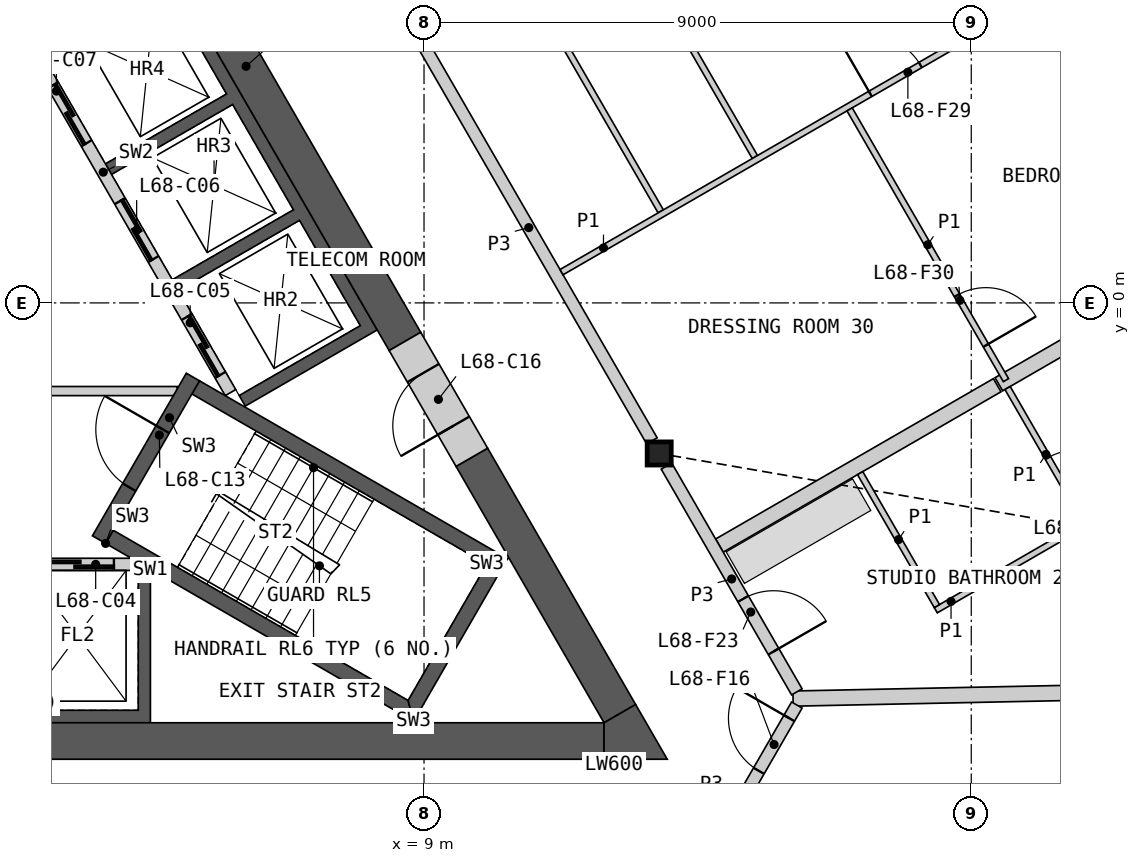
"""IFC4 building model, lengths in metres.
Left out: names, types, materials, properties, quantities, classifications, styles, units other than length and angle.
Written with IfcOpenShell. Run it as: python <this file> out.ifc"""

import sys

from ifc_helpers import new_model, si_unit, direction, frame, frame_2d, origin, origin_2d, place, context, subcontext, project, spatial, polyline, rectangle, i_section, outline, extrude, element, fill, save


model = new_model("IFC4")
c1 = context("Model", 3, precision=1e-05, world=origin(), true_north=direction((0.0, 1.0)))
c2 = subcontext(c1, "Body", "Model", "MODEL_VIEW")
j1 = project(units=[si_unit("LENGTHUNIT", "METRE"), si_unit("PLANEANGLEUNIT", "RADIAN")], contexts=[c1])
p1 = place(None, origin())
s1 = spatial("IfcSite", under=j1, at=p1, CompositionType="ELEMENT")
p2 = place(p1, origin())
s2 = spatial("IfcBuilding", under=s1, at=p2, CompositionType="ELEMENT")
p3 = place(p2, frame((0.0, 0.0, 312.0)))
s3 = spatial("IfcBuildingStorey", under=s2, at=p3, CompositionType="ELEMENT", Elevation=312.0)
p4 = place(p3, frame((12.868, -2.476, 0.0), z_axis=(0.0, 0.0, 1.0), x_axis=(1.0, 0.0, 0.0)))
e1 = element("IfcColumn", 1, at=p4, inside=s3, PredefinedType="COLUMN", context=c2, shape_type="SweptSolid", body=[
    extrude(i_section(OverallWidth=0.396, OverallDepth=0.381, WebThickness=0.019, FlangeThickness=0.03, at=origin_2d()), origin(), (0.0, 0.0, 1.0), 3.4),
])
p5 = place(p3, frame((25.155, 2.826, 0.0), z_axis=(0.0, 0.0, 1.0), x_axis=(-0.951053709789, 0.309025631781, 0.0)))
e2 = element("IfcWall", 2, at=p5, inside=s3, PredefinedType="SOLIDWALL", context=c2, shape_type="SweptSolid", body=[
    extrude(rectangle(XDim=6.12, YDim=0.2, at=frame_2d((3.06, 0.0))), origin(), (0.0, 0.0, 1.0), 2.488),
])
p6 = place(p5, frame((2.26, 0.0, 0.0)))
e3 = element("IfcOpeningElement", 3, at=p6, cuts=e2, PredefinedType="OPENING", context=c2, shape_type="SweptSolid", body=[
    extrude(rectangle(XDim=1.6, YDim=2.25, at=frame_2d((0.8, 1.125))), frame((0.0, 0.11, 0.0), z_axis=(0.0, -1.0, 0.0), x_axis=(1.0, 0.0, 0.0)), (0.0, 0.0, 1.0), 0.22),
])
p7 = place(p3, origin())
e4 = element("IfcWall", 4, at=p7, inside=s3, PredefinedType="SHEAR", context=c2, shape_type="SweptSolid", body=[
    extrude(outline(polyline([(4.5, -4.4), (4.5, -6.906), (-4.5, -6.906), (-4.5, -4.4), (-4.3, -4.4), (-4.3, -6.7), (-2.3, -6.7), (-2.3, -4.4), (-2.1, -4.4), (-2.1, -6.7), (-0.1, -6.7), (-0.1, -4.4), (0.1, -4.4), (0.1, -6.7), (2.1, -6.7), (2.1, -4.4), (2.3, -4.4), (2.3, -6.7), (4.3, -6.7), (4.3, -4.4), (4.5, -4.4)])), origin(), (0.0, 0.0, 1.0), 3.1),
])
p8 = place(p3, frame((-4.187, -4.3, 0.0), z_axis=(0.0, 0.0, 1.0), x_axis=(1.0, 0.0, 0.0)))
e5 = element("IfcWall", 5, at=p8, inside=s3, PredefinedType="SOLIDWALL", context=c2, shape_type="SweptSolid", body=[
    extrude(rectangle(XDim=8.373, YDim=0.2, at=frame_2d((4.187, 0.0))), origin(), (0.0, 0.0, 1.0), 3.1),
])
p9 = place(p8, frame((0.287, 0.0, 0.0)))
e6 = element("IfcOpeningElement", 6, at=p9, cuts=e5, PredefinedType="OPENING", context=c2, shape_type="SweptSolid", body=[
    extrude(rectangle(XDim=1.2, YDim=2.1, at=frame_2d((0.6, 1.05))), frame((0.0, 0.11, 0.0), z_axis=(0.0, -1.0, 0.0), x_axis=(1.0, 0.0, 0.0)), (0.0, 0.0, 1.0), 0.22),
])
p10 = place(p8, frame((2.387, 0.0, 0.0)))
e7 = element("IfcOpeningElement", 7, at=p10, cuts=e5, PredefinedType="OPENING", context=c2, shape_type="SweptSolid", body=[
    extrude(rectangle(XDim=1.4, YDim=2.1, at=frame_2d((0.7, 1.05))), frame((0.0, 0.11, 0.0), z_axis=(0.0, -1.0, 0.0), x_axis=(1.0, 0.0, 0.0)), (0.0, 0.0, 1.0), 0.22),
])
p11 = place(p8, frame((4.737, 0.0, 0.0)))
e8 = element("IfcOpeningElement", 8, at=p11, cuts=e5, PredefinedType="OPENING", context=c2, shape_type="SweptSolid", body=[
    extrude(rectangle(XDim=1.1, YDim=2.1, at=frame_2d((0.55, 1.05))), frame((0.0, 0.11, 0.0), z_axis=(0.0, -1.0, 0.0), x_axis=(1.0, 0.0, 0.0)), (0.0, 0.0, 1.0), 0.22),
])
p12 = place(p8, frame((6.887, 0.0, 0.0)))
e9 = element("IfcOpeningElement", 9, at=p12, cuts=e5, PredefinedType="OPENING", context=c2, shape_type="SweptSolid", body=[
    extrude(rectangle(XDim=1.2, YDim=2.1, at=frame_2d((0.6, 1.05))), frame((0.0, 0.11, 0.0), z_axis=(0.0, -1.0, 0.0), x_axis=(1.0, 0.0, 0.0)), (0.0, 0.0, 1.0), 0.22),
])
p13 = place(p3, origin())
e10 = element("IfcWall", 10, at=p13, inside=s3, PredefinedType="SHEAR", context=c2, shape_type="SweptSolid", body=[
    extrude(outline(polyline([(1.561, 6.097), (3.731, 7.35), (8.231, -0.444), (6.061, -1.697), (5.96, -1.524), (7.952, -0.374), (6.952, 1.358), (4.96, 0.208), (4.861, 0.381), (6.852, 1.531), (5.852, 3.263), (3.861, 2.113), (3.76, 2.287), (5.752, 3.437), (4.752, 5.169), (2.76, 4.019), (2.66, 4.192), (4.652, 5.342), (3.652, 7.074), (1.66, 5.924), (1.561, 6.097)])), origin(), (0.0, 0.0, 1.0), 3.1),
])
p14 = place(p3, frame((5.817, -1.476, 0.0), z_axis=(0.0, 0.0, 1.0), x_axis=(-0.500002616675, 0.866023893041, 0.0)))
e11 = element("IfcWall", 11, at=p14, inside=s3, PredefinedType="SOLIDWALL", context=c2, shape_type="SweptSolid", body=[
    extrude(rectangle(XDim=8.373, YDim=0.2, at=frame_2d((4.187, 0.0))), origin(), (0.0, 0.0, 1.0), 3.1),
])
p15 = place(p14, frame((0.337, 0.0, 0.0)))
e12 = element("IfcOpeningElement", 12, at=p15, cuts=e11, PredefinedType="OPENING", context=c2, shape_type="SweptSolid", body=[
    extrude(rectangle(XDim=1.1, YDim=2.1, at=frame_2d((0.55, 1.05))), frame((0.0, 0.11, 0.0), z_axis=(0.0, -1.0, 0.0), x_axis=(1.0, 0.0, 0.0)), (0.0, 0.0, 1.0), 0.22),
])
p16 = place(p14, frame((2.537, 0.0, 0.0)))
e13 = element("IfcOpeningElement", 13, at=p16, cuts=e11, PredefinedType="OPENING", context=c2, shape_type="SweptSolid", body=[
    extrude(rectangle(XDim=1.1, YDim=2.1, at=frame_2d((0.55, 1.05))), frame((0.0, 0.11, 0.0), z_axis=(0.0, -1.0, 0.0), x_axis=(1.0, 0.0, 0.0)), (0.0, 0.0, 1.0), 0.22),
])
p17 = place(p14, frame((4.737, 0.0, 0.0)))
e14 = element("IfcOpeningElement", 14, at=p17, cuts=e11, PredefinedType="OPENING", context=c2, shape_type="SweptSolid", body=[
    extrude(rectangle(XDim=1.1, YDim=2.1, at=frame_2d((0.55, 1.05))), frame((0.0, 0.11, 0.0), z_axis=(0.0, -1.0, 0.0), x_axis=(1.0, 0.0, 0.0)), (0.0, 0.0, 1.0), 0.22),
])
p18 = place(p14, frame((7.037, 0.0, 0.0)))
e15 = element("IfcOpeningElement", 15, at=p18, cuts=e11, PredefinedType="OPENING", context=c2, shape_type="SweptSolid", body=[
    extrude(rectangle(XDim=0.9, YDim=2.1, at=frame_2d((0.45, 1.05))), frame((0.0, 0.11, 0.0), z_axis=(0.0, -1.0, 0.0), x_axis=(1.0, 0.0, 0.0)), (0.0, 0.0, 1.0), 0.22),
])
p19 = place(p3, frame((-4.941, -1.45, 0.0), z_axis=(0.0, 0.0, 1.0), x_axis=(1.0, 0.0, 0.0)))
e16 = element("IfcWall", 16, at=p19, inside=s3, PredefinedType="PARTITIONING", context=c2, shape_type="SweptSolid", body=[
    extrude(rectangle(XDim=9.882, YDim=0.15, at=frame_2d((4.941, 0.0))), origin(), (0.0, 0.0, 1.0), 3.1),
])
p20 = place(p19, frame((4.391, 0.0, 0.0)))
e17 = element("IfcOpeningElement", 17, at=p20, cuts=e16, PredefinedType="OPENING", context=c2, shape_type="SweptSolid", body=[
    extrude(rectangle(XDim=1.1, YDim=2.1, at=frame_2d((0.55, 1.05))), frame((0.0, 0.085, 0.0), z_axis=(0.0, -1.0, 0.0), x_axis=(1.0, 0.0, 0.0)), (0.0, 0.0, 1.0), 0.17),
])
p21 = place(p3, origin())
e18 = element("IfcWall", 18, at=p21, inside=s3, PredefinedType="SHEAR", context=c2, shape_type="SweptSolid", body=[
    extrude(outline(polyline([(3.763, -3.956), (8.83, -6.881), (8.738, -6.539), (3.888, -3.739), (3.763, -3.956)])), origin(), (0.0, 0.0, 1.0), 3.1),
])
p22 = place(p3, origin())
e19 = element("IfcWall", 19, at=p22, inside=s3, PredefinedType="SHEAR", context=c2, shape_type="SweptSolid", body=[
    extrude(outline(polyline([(8.83, -6.881), (10.374, -4.206), (10.032, -4.298), (8.738, -6.539), (8.83, -6.881)])), origin(), (0.0, 0.0, 1.0), 3.1),
])
p23 = place(p3, origin())
e20 = element("IfcWall", 20, at=p23, inside=s3, PredefinedType="SHEAR", context=c2, shape_type="SweptSolid", body=[
    extrude(outline(polyline([(10.032, -4.298), (10.374, -4.206), (5.307, -1.281), (5.182, -1.498), (10.032, -4.298)])), origin(), (0.0, 0.0, 1.0), 3.1),
])
p24 = place(p3, frame((3.655, -3.893, 0.0), z_axis=(0.0, 0.0, 1.0), x_axis=(0.499982516597, 0.866035497597, 0.0)))
e21 = element("IfcWall", 21, at=p24, inside=s3, PredefinedType="SHEAR", context=c2, shape_type="SweptSolid", body=[
    extrude(rectangle(XDim=3.088, YDim=0.25, at=frame_2d((1.544, 0.0))), origin(), (0.0, 0.0, 1.0), 3.1),
])
p25 = place(p24, frame((0.994, 0.0, 0.0)))
e22 = element("IfcOpeningElement", 22, at=p25, cuts=e21, PredefinedType="OPENING", context=c2, shape_type="SweptSolid", body=[
    extrude(rectangle(XDim=1.1, YDim=2.1, at=frame_2d((0.55, 1.05))), frame((0.0, 0.135, 0.0), z_axis=(0.0, -1.0, 0.0), x_axis=(1.0, 0.0, 0.0)), (0.0, 0.0, 1.0), 0.27),
])
p26 = place(p3, frame((-11.961, -7.206, 0.0), z_axis=(0.0, 0.0, 1.0), x_axis=(1.0, 0.0, 0.0)))
e23 = element("IfcWall", 23, at=p26, inside=s3, PredefinedType="SHEAR", context=c2, shape_type="SweptSolid", body=[
    extrude(rectangle(XDim=23.921, YDim=0.6, at=frame_2d((11.961, 0.0))), origin(), (0.0, 0.0, 1.0), 3.1),
])
p27 = place(p3, frame((8.686, -0.634, 0.0), z_axis=(0.0, 0.0, 1.0), x_axis=(-0.50001836461, 0.866014800712, 0.0)))
e24 = element("IfcWall", 24, at=p27, inside=s3, PredefinedType="SHEAR", context=c2, shape_type="SweptSolid", body=[
    extrude(rectangle(XDim=10.451, YDim=0.6, at=frame_2d((5.225, 0.0))), origin(), (0.0, 0.0, 1.0), 3.1),
])
p28 = place(p3, frame((12.221, -6.756, 0.0), z_axis=(0.0, 0.0, 1.0), x_axis=(-0.50000604952, 0.866021911064, 0.0)))
e25 = element("IfcWall", 25, at=p28, inside=s3, PredefinedType="SHEAR", context=c2, shape_type="SweptSolid", body=[
    extrude(rectangle(XDim=4.869, YDim=0.6, at=frame_2d((2.434, 0.0))), origin(), (0.0, 0.0, 1.0), 3.1),
])
p29 = place(p3, origin())
e26 = element("IfcWall", 26, at=p29, inside=s3, PredefinedType="SHEAR", context=c2, shape_type="SweptSolid", body=[
    extrude(outline(polyline([(11.961, -7.506), (11.961, -6.906), (12.48, -6.606), (13.0, -7.506), (11.961, -7.506)])), origin(), (0.0, 0.0, 1.0), 3.1),
])
p30 = place(p3, frame((9.786, -2.539, 0.0), z_axis=(0.0, 0.0, 1.0), x_axis=(-0.499981787252, 0.866035918664, 0.0)))
e27 = element("IfcWall", 27, at=p30, inside=s3, PredefinedType="SHEAR", context=c2, shape_type="SweptSolid", body=[
    extrude(rectangle(XDim=2.2, YDim=0.6, at=frame_2d((1.1, 0.0))), origin(), (0.0, 0.0, 1.0), 3.1),
])
p31 = place(p30, frame((0.6, 0.0, 0.0)))
e28 = element("IfcOpeningElement", 28, at=p31, cuts=e27, PredefinedType="OPENING", context=c2, shape_type="SweptSolid", body=[
    extrude(rectangle(XDim=1.0, YDim=2.1, at=frame_2d((0.5, 1.05))), frame((0.0, 0.31, 0.0), z_axis=(0.0, -1.0, 0.0), x_axis=(1.0, 0.0, 0.0)), (0.0, 0.0, 1.0), 0.62),
])
p32 = place(p3, frame((15.069, -6.508, 0.0), z_axis=(0.0, 0.0, 1.0), x_axis=(0.999786619639, 0.02065708573, 0.0)))
e29 = element("IfcWall", 29, at=p32, inside=s3, PredefinedType="PARTITIONING", context=c2, shape_type="SweptSolid", body=[
    extrude(rectangle(XDim=14.951, YDim=0.25, at=frame_2d((7.475, 0.0))), origin(), (0.0, 0.0, 1.0), 2.33),
])
p33 = place(p3, frame((8.698, 4.745, 0.0), z_axis=(0.0, 0.0, 1.0), x_axis=(0.499984266882, -0.866034487114, 0.0)))
e30 = element("IfcWall", 30, at=p33, inside=s3, PredefinedType="PARTITIONING", context=c2, shape_type="SweptSolid", body=[
    extrude(rectangle(XDim=8.099, YDim=0.2, at=frame_2d((4.049, 0.0))), origin(), (0.0, 0.0, 1.0), 3.1),
])
p34 = place(p3, frame((18.454, -1.338, 0.0), z_axis=(0.0, 0.0, 1.0), x_axis=(0.866023407002, 0.500003458512, 0.0)))
e31 = element("IfcWall", 31, at=p34, inside=s3, PredefinedType="PARTITIONING", context=c2, shape_type="SweptSolid", body=[
    extrude(rectangle(XDim=7.345, YDim=0.25, at=frame_2d((3.673, 0.0))), origin(), (0.0, 0.0, 1.0), 2.33),
])
p35 = place(p3, frame((13.858, -3.991, 0.0), z_axis=(0.0, 0.0, 1.0), x_axis=(0.866032983855, 0.499986870703, 0.0)))
e32 = element("IfcWall", 32, at=p35, inside=s3, PredefinedType="PARTITIONING", context=c2, shape_type="SweptSolid", body=[
    extrude(rectangle(XDim=5.275, YDim=0.25, at=frame_2d((2.638, 0.0))), origin(), (0.0, 0.0, 1.0), 2.33),
])
p36 = place(p3, frame((12.988, -2.684, 0.0), z_axis=(0.0, 0.0, 1.0), x_axis=(0.500003406062, -0.866023437285, 0.0)))
e33 = element("IfcWall", 33, at=p36, inside=s3, PredefinedType="PARTITIONING", context=c2, shape_type="SweptSolid", body=[
    extrude(rectangle(XDim=4.288, YDim=0.2, at=frame_2d((2.144, 0.0))), origin(), (0.0, 0.0, 1.0), 3.1),
])
p37 = place(p36, frame((2.521, 0.0, 0.0)))
e34 = element("IfcOpeningElement", 34, at=p37, cuts=e33, PredefinedType="OPENING", context=c2, shape_type="SweptSolid", body=[
    extrude(rectangle(XDim=1.0, YDim=2.1, at=frame_2d((0.5, 1.05))), frame((0.0, 0.11, 0.0), z_axis=(0.0, -1.0, 0.0), x_axis=(1.0, 0.0, 0.0)), (0.0, 0.0, 1.0), 0.22),
])
p38 = place(p3, frame((13.293, -9.797, 0.0), z_axis=(0.0, 0.0, 1.0), x_axis=(0.499967746641, 0.866044024469, 0.0)))
e35 = element("IfcWall", 35, at=p38, inside=s3, PredefinedType="PARTITIONING", context=c2, shape_type="SweptSolid", body=[
    extrude(rectangle(XDim=3.676, YDim=0.2, at=frame_2d((1.838, 0.0))), origin(), (0.0, 0.0, 1.0), 3.1),
])
p39 = place(p38, frame((2.426, 0.0, 0.0)))
e36 = element("IfcOpeningElement", 36, at=p39, cuts=e35, PredefinedType="OPENING", context=c2, shape_type="SweptSolid", body=[
    extrude(rectangle(XDim=1.0, YDim=2.1, at=frame_2d((0.5, 1.05))), frame((0.0, 0.11, 0.0), z_axis=(0.0, -1.0, 0.0), x_axis=(1.0, 0.0, 0.0)), (0.0, 0.0, 1.0), 0.22),
])
p40 = place(p3, frame((6.74, 15.739, 0.0), z_axis=(0.0, 0.0, 1.0), x_axis=(0.499995022685, -0.86602827742, 0.0)))
e37 = element("IfcWall", 37, at=p40, inside=s3, PredefinedType="PARTITIONING", context=c2, shape_type="SweptSolid", body=[
    extrude(rectangle(XDim=15.404, YDim=0.1, at=frame_2d((7.702, 0.0))), origin(), (0.0, 0.0, 1.0), 2.33),
])
p41 = place(p40, frame((8.582, 0.0, 0.0)))
e38 = element("IfcOpeningElement", 38, at=p41, cuts=e37, PredefinedType="OPENING", context=c2, shape_type="SweptSolid", body=[
    extrude(rectangle(XDim=0.95, YDim=2.1, at=frame_2d((0.475, 1.05))), frame((0.0, 0.06, 0.0), z_axis=(0.0, -1.0, 0.0), x_axis=(1.0, 0.0, 0.0)), (0.0, 0.0, 1.0), 0.12),
])
p42 = place(p3, frame((6.504, 12.572, 0.0), z_axis=(0.0, 0.0, 1.0), x_axis=(0.499998094172, -0.866026504112, 0.0)))
e39 = element("IfcWall", 39, at=p42, inside=s3, PredefinedType="PARTITIONING", context=c2, shape_type="SweptSolid", body=[
    extrude(rectangle(XDim=12.778, YDim=0.1, at=frame_2d((6.389, 0.0))), origin(), (0.0, 0.0, 1.0), 2.33),
])
p43 = place(p42, frame((3.759, 0.0, 0.0)))
e40 = element("IfcOpeningElement", 40, at=p43, cuts=e39, PredefinedType="OPENING", context=c2, shape_type="SweptSolid", body=[
    extrude(rectangle(XDim=0.95, YDim=2.1, at=frame_2d((0.475, 1.05))), frame((0.0, 0.06, 0.0), z_axis=(0.0, -1.0, 0.0), x_axis=(1.0, 0.0, 0.0)), (0.0, 0.0, 1.0), 0.12),
])
p44 = place(p3, frame((11.261, 0.506, 0.0), z_axis=(0.0, 0.0, 1.0), x_axis=(0.866024323732, 0.500001870701, 0.0)))
e41 = element("IfcWall", 41, at=p44, inside=s3, PredefinedType="PARTITIONING", context=c2, shape_type="SweptSolid", body=[
    extrude(rectangle(XDim=7.967, YDim=0.1, at=frame_2d((3.983, 0.0))), origin(), (0.0, 0.0, 1.0), 2.33),
])
p45 = place(p44, frame((5.865, 0.0, 0.0)))
e42 = element("IfcOpeningElement", 42, at=p45, cuts=e41, PredefinedType="OPENING", context=c2, shape_type="SweptSolid", body=[
    extrude(rectangle(XDim=0.95, YDim=2.1, at=frame_2d((0.475, 1.05))), frame((0.0, 0.06, 0.0), z_axis=(0.0, -1.0, 0.0), x_axis=(1.0, 0.0, 0.0)), (0.0, 0.0, 1.0), 0.12),
])
p46 = place(p3, frame((15.999, 3.183, 0.0), z_axis=(0.0, 0.0, 1.0), x_axis=(0.500014207086, -0.866017201164, 0.0)))
e43 = element("IfcWall", 43, at=p46, inside=s3, PredefinedType="PARTITIONING", context=c2, shape_type="SweptSolid", body=[
    extrude(rectangle(XDim=5.143, YDim=0.1, at=frame_2d((2.571, 0.0))), origin(), (0.0, 0.0, 1.0), 2.33),
])
p47 = place(p46, frame((3.532, 0.0, 0.0)))
e44 = element("IfcOpeningElement", 44, at=p47, cuts=e43, PredefinedType="OPENING", context=c2, shape_type="SweptSolid", body=[
    extrude(rectangle(XDim=0.95, YDim=2.1, at=frame_2d((0.475, 1.05))), frame((0.0, 0.06, 0.0), z_axis=(0.0, -1.0, 0.0), x_axis=(1.0, 0.0, 0.0)), (0.0, 0.0, 1.0), 0.12),
])
p48 = place(p3, frame((17.416, -5.055, 0.0), z_axis=(0.0, 0.0, 1.0), x_axis=(0.866032775405, 0.499987231761, 0.0)))
e45 = element("IfcWall", 45, at=p48, inside=s3, PredefinedType="PARTITIONING", context=c2, shape_type="SweptSolid", body=[
    extrude(rectangle(XDim=2.9, YDim=0.1, at=frame_2d((1.45, 0.0))), origin(), (0.0, 0.0, 1.0), 2.33),
])
p49 = place(p3, frame((16.172, -2.8, 0.0), z_axis=(0.0, 0.0, 1.0), x_axis=(0.50001820224, -0.866014894461, 0.0)))
e46 = element("IfcWall", 46, at=p49, inside=s3, PredefinedType="PARTITIONING", context=c2, shape_type="SweptSolid", body=[
    extrude(rectangle(XDim=2.525, YDim=0.1, at=frame_2d((1.262, 0.0))), origin(), (0.0, 0.0, 1.0), 2.33),
])
p50 = place(p3, frame((18.597, -1.4, 0.0), z_axis=(0.0, 0.0, 1.0), x_axis=(0.499976333282, -0.866039067339, 0.0)))
e47 = element("IfcWall", 47, at=p50, inside=s3, PredefinedType="PARTITIONING", context=c2, shape_type="SweptSolid", body=[
    extrude(rectangle(XDim=2.525, YDim=0.1, at=frame_2d((1.262, 0.0))), origin(), (0.0, 0.0, 1.0), 2.33),
])
p51 = place(p50, frame((1.325, 0.0, 0.0)))
e48 = element("IfcOpeningElement", 48, at=p51, cuts=e47, PredefinedType="OPENING", context=c2, shape_type="SweptSolid", body=[
    extrude(rectangle(XDim=0.95, YDim=2.1, at=frame_2d((0.475, 1.05))), frame((0.0, 0.06, 0.0), z_axis=(0.0, -1.0, 0.0), x_axis=(1.0, 0.0, 0.0)), (0.0, 0.0, 1.0), 0.12),
])
p52 = place(p12, origin())
e49 = element("IfcDoor", 49, at=p52, inside=s3, OperationType="SLIDING_TO_LEFT", PredefinedType="DOOR", context=c2, shape_type="SweptSolid", body=[
    extrude(rectangle(XDim=1.2, YDim=2.1, at=frame_2d((0.6, 1.05))), frame((0.0, 0.025, 0.0), z_axis=(0.0, -1.0, 0.0), x_axis=(1.0, 0.0, 0.0)), (0.0, 0.0, 1.0), 0.05),
])
fill(e9, e49)
p53 = place(p15, origin())
e50 = element("IfcDoor", 50, at=p53, inside=s3, OperationType="SLIDING_TO_LEFT", PredefinedType="DOOR", context=c2, shape_type="SweptSolid", body=[
    extrude(rectangle(XDim=1.1, YDim=2.1, at=frame_2d((0.55, 1.05))), frame((0.0, 0.025, 0.0), z_axis=(0.0, -1.0, 0.0), x_axis=(1.0, 0.0, 0.0)), (0.0, 0.0, 1.0), 0.05),
])
fill(e12, e50)
p54 = place(p16, origin())
e51 = element("IfcDoor", 51, at=p54, inside=s3, OperationType="SLIDING_TO_LEFT", PredefinedType="DOOR", context=c2, shape_type="SweptSolid", body=[
    extrude(rectangle(XDim=1.1, YDim=2.1, at=frame_2d((0.55, 1.05))), frame((0.0, 0.025, 0.0), z_axis=(0.0, -1.0, 0.0), x_axis=(1.0, 0.0, 0.0)), (0.0, 0.0, 1.0), 0.05),
])
fill(e13, e51)
p55 = place(p17, origin())
e52 = element("IfcDoor", 52, at=p55, inside=s3, OperationType="SLIDING_TO_LEFT", PredefinedType="DOOR", context=c2, shape_type="SweptSolid", body=[
    extrude(rectangle(XDim=1.1, YDim=2.1, at=frame_2d((0.55, 1.05))), frame((0.0, 0.025, 0.0), z_axis=(0.0, -1.0, 0.0), x_axis=(1.0, 0.0, 0.0)), (0.0, 0.0, 1.0), 0.05),
])
fill(e14, e52)
p56 = place(p25, origin())
e53 = element("IfcDoor", 53, at=p56, inside=s3, OperationType="SINGLE_SWING_RIGHT", PredefinedType="DOOR", context=c2, shape_type="SweptSolid", body=[
    extrude(rectangle(XDim=1.1, YDim=2.1, at=frame_2d((0.55, 1.05))), frame((0.0, 0.025, 0.0), z_axis=(0.0, -1.0, 0.0), x_axis=(1.0, 0.0, 0.0)), (0.0, 0.0, 1.0), 0.05),
])
fill(e22, e53)
p57 = place(p31, origin())
e54 = element("IfcDoor", 54, at=p57, inside=s3, OperationType="SINGLE_SWING_LEFT", PredefinedType="DOOR", context=c2, shape_type="SweptSolid", body=[
    extrude(rectangle(XDim=1.0, YDim=2.1, at=frame_2d((0.5, 1.05))), frame((0.0, 0.055, 0.0), z_axis=(0.0, -1.0, 0.0), x_axis=(1.0, 0.0, 0.0)), (0.0, 0.0, 1.0), 0.05),
])
fill(e28, e54)
p58 = place(p39, origin())
e55 = element("IfcDoor", 55, at=p58, inside=s3, OperationType="SINGLE_SWING_RIGHT", PredefinedType="DOOR", context=c2, shape_type="SweptSolid", body=[
    extrude(rectangle(XDim=1.0, YDim=2.1, at=frame_2d((0.5, 1.05))), frame((0.0, 0.025, 0.0), z_axis=(0.0, -1.0, 0.0), x_axis=(1.0, 0.0, 0.0)), (0.0, 0.0, 1.0), 0.05),
])
fill(e36, e55)
p59 = place(p37, origin())
e56 = element("IfcDoor", 56, at=p59, inside=s3, OperationType="SINGLE_SWING_RIGHT", PredefinedType="DOOR", context=c2, shape_type="SweptSolid", body=[
    extrude(rectangle(XDim=1.0, YDim=2.1, at=frame_2d((0.5, 1.05))), frame((0.0, 0.025, 0.0), z_axis=(0.0, -1.0, 0.0), x_axis=(1.0, 0.0, 0.0)), (0.0, 0.0, 1.0), 0.05),
])
fill(e34, e56)
p60 = place(p51, origin())
e57 = element("IfcDoor", 57, at=p60, inside=s3, OperationType="SINGLE_SWING_RIGHT", PredefinedType="DOOR", context=c2, shape_type="SweptSolid", body=[
    extrude(rectangle(XDim=0.95, YDim=2.1, at=frame_2d((0.475, 1.05))), frame((0.0, 0.025, 0.0), z_axis=(0.0, -1.0, 0.0), x_axis=(1.0, 0.0, 0.0)), (0.0, 0.0, 1.0), 0.05),
])
fill(e48, e57)
p61 = place(p45, origin())
e58 = element("IfcDoor", 58, at=p61, inside=s3, OperationType="SINGLE_SWING_LEFT", PredefinedType="DOOR", context=c2, shape_type="SweptSolid", body=[
    extrude(rectangle(XDim=0.95, YDim=2.1, at=frame_2d((0.475, 1.05))), frame((0.0, 0.025, 0.0), z_axis=(0.0, -1.0, 0.0), x_axis=(1.0, 0.0, 0.0)), (0.0, 0.0, 1.0), 0.05),
])
fill(e42, e58)
p62 = place(p47, origin())
e59 = element("IfcDoor", 59, at=p62, inside=s3, OperationType="SINGLE_SWING_RIGHT", PredefinedType="DOOR", context=c2, shape_type="SweptSolid", body=[
    extrude(rectangle(XDim=0.95, YDim=2.1, at=frame_2d((0.475, 1.05))), frame((0.0, 0.025, 0.0), z_axis=(0.0, -1.0, 0.0), x_axis=(1.0, 0.0, 0.0)), (0.0, 0.0, 1.0), 0.05),
])
fill(e44, e59)
save(model, sys.argv[1])
